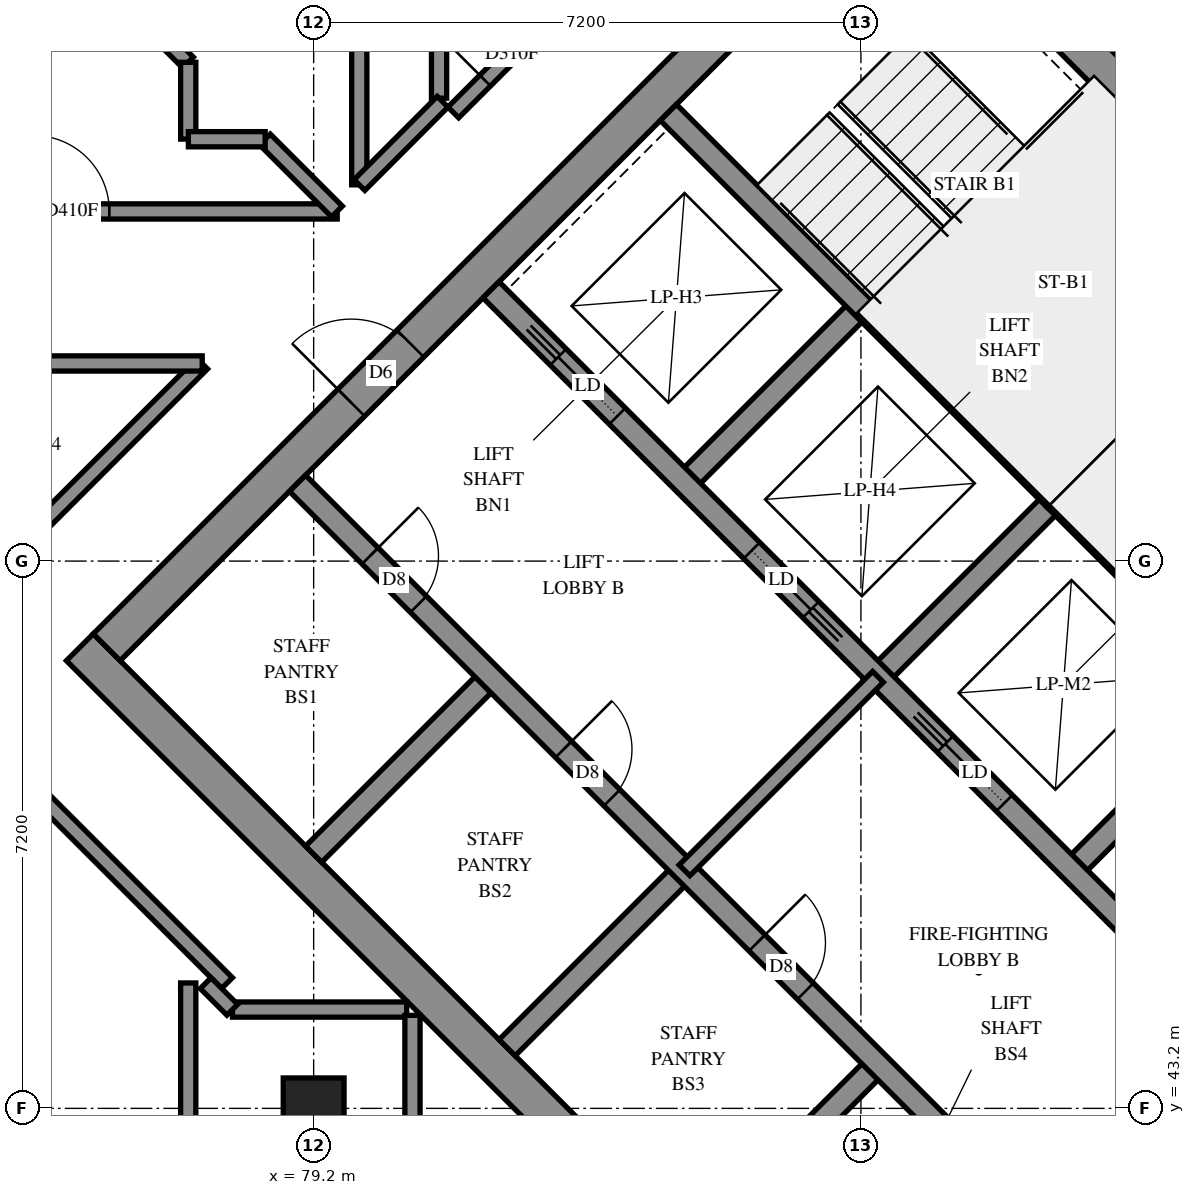
"""IFC4 building model, lengths in metres.
Left out: names, types, materials, properties, quantities, classifications, styles, units other than length and angle.
Written with IfcOpenShell. Run it as: python <this file> out.ifc"""

import sys

from ifc_helpers import new_model, si_unit, direction, frame, frame_2d, origin, origin_2d, place, context, subcontext, project, spatial, rectangle, extrude, element, fill, save


model = new_model("IFC4")
c1 = context("Model", 3, precision=1e-05, world=origin(), true_north=direction((0.0, 1.0)))
c2 = subcontext(c1, "Body", "Model", "MODEL_VIEW")
j1 = project(units=[si_unit("LENGTHUNIT", "METRE"), si_unit("PLANEANGLEUNIT", "RADIAN")], contexts=[c1])
p1 = place(None, origin())
s1 = spatial("IfcSite", under=j1, at=p1, CompositionType="ELEMENT")
p2 = place(p1, origin())
s2 = spatial("IfcBuilding", under=s1, at=p2, CompositionType="ELEMENT")
p3 = place(p2, frame((0.0, 0.0, 210.0)))
s3 = spatial("IfcBuildingStorey", under=s2, at=p3, CompositionType="ELEMENT", Elevation=210.0)
p4 = place(p3, frame((79.2, 43.2, 0.0), z_axis=(0.0, 0.0, 1.0), x_axis=(1.0, 0.0, 0.0)))
e1 = element("IfcColumn", 1, at=p4, inside=s3, PredefinedType="COLUMN", context=c2, shape_type="SweptSolid", body=[
    extrude(rectangle(XDim=0.8, YDim=0.8, at=origin_2d()), origin(), (0.0, 0.0, 1.0), 3.1),
])
p5 = place(p3, frame((76.124, 49.267, -0.3), z_axis=(0.0, 0.0, 1.0), x_axis=(0.7071067812, -0.7071067812, 0.0)))
e2 = element("IfcWall", 2, at=p5, inside=s3, PredefinedType="SHEAR", context=c2, shape_type="SweptSolid", body=[
    extrude(rectangle(XDim=15.4, YDim=0.5, at=frame_2d((7.7, 0.0))), origin(), (0.0, 0.0, 1.0), 2.7),
])
p6 = place(p3, frame((86.66, 59.802, -0.3), z_axis=(0.0, 0.0, 1.0), x_axis=(0.7071067812, -0.7071067812, 0.0)))
e3 = element("IfcWall", 3, at=p6, inside=s3, PredefinedType="SHEAR", context=c2, shape_type="SweptSolid", body=[
    extrude(rectangle(XDim=15.4, YDim=0.5, at=frame_2d((7.7, 0.0))), origin(), (0.0, 0.0, 1.0), 2.7),
])
p7 = place(p6, frame((10.5, 0.0, 0.3)))
e4 = element("IfcOpeningElement", 4, at=p7, cuts=e3, PredefinedType="OPENING", context=c2, shape_type="SweptSolid", body=[
    extrude(rectangle(XDim=0.8, YDim=2.1, at=frame_2d((0.4, 1.05))), frame((0.0, 0.26, 0.0), z_axis=(0.0, -1.0, 0.0), x_axis=(1.0, 0.0, 0.0)), (0.0, 0.0, 1.0), 0.52),
])
p8 = place(p3, frame((76.478, 49.267, -0.3), z_axis=(0.0, 0.0, 1.0), x_axis=(0.7071067812, 0.7071067812, 0.0)))
e5 = element("IfcWall", 5, at=p8, inside=s3, PredefinedType="SHEAR", context=c2, shape_type="SweptSolid", body=[
    extrude(rectangle(XDim=14.4, YDim=0.5, at=frame_2d((7.2, 0.0))), origin(), (0.0, 0.0, 1.0), 2.7),
])
p9 = place(p8, frame((4.55, 0.0, 0.3)))
e6 = element("IfcOpeningElement", 6, at=p9, cuts=e5, PredefinedType="OPENING", context=c2, shape_type="SweptSolid", body=[
    extrude(rectangle(XDim=1.1, YDim=2.1, at=frame_2d((0.55, 1.05))), frame((0.0, 0.26, 0.0), z_axis=(0.0, -1.0, 0.0), x_axis=(1.0, 0.0, 0.0)), (0.0, 0.0, 1.0), 0.52),
])
p10 = place(p8, frame((11.35, 0.0, 0.3)))
e7 = element("IfcOpeningElement", 7, at=p10, cuts=e5, PredefinedType="OPENING", context=c2, shape_type="SweptSolid", body=[
    extrude(rectangle(XDim=1.1, YDim=2.1, at=frame_2d((0.55, 1.05))), frame((0.0, 0.26, 0.0), z_axis=(0.0, -1.0, 0.0), x_axis=(1.0, 0.0, 0.0)), (0.0, 0.0, 1.0), 0.52),
])
p11 = place(p3, frame((87.013, 38.731, -0.3), z_axis=(0.0, 0.0, 1.0), x_axis=(0.7071067812, 0.7071067812, 0.0)))
e8 = element("IfcWall", 8, at=p11, inside=s3, PredefinedType="SHEAR", context=c2, shape_type="SweptSolid", body=[
    extrude(rectangle(XDim=14.4, YDim=0.5, at=frame_2d((7.2, 0.0))), origin(), (0.0, 0.0, 1.0), 2.7),
])
p12 = place(p11, frame((4.55, 0.0, 0.3)))
e9 = element("IfcOpeningElement", 9, at=p12, cuts=e8, PredefinedType="OPENING", context=c2, shape_type="SweptSolid", body=[
    extrude(rectangle(XDim=1.1, YDim=2.1, at=frame_2d((0.55, 1.05))), frame((0.0, 0.26, 0.0), z_axis=(0.0, -1.0, 0.0), x_axis=(1.0, 0.0, 0.0)), (0.0, 0.0, 1.0), 0.52),
])
p13 = place(p11, frame((11.35, 0.0, 0.3)))
e10 = element("IfcOpeningElement", 10, at=p13, cuts=e8, PredefinedType="OPENING", context=c2, shape_type="SweptSolid", body=[
    extrude(rectangle(XDim=1.1, YDim=2.1, at=frame_2d((0.55, 1.05))), frame((0.0, 0.26, 0.0), z_axis=(0.0, -1.0, 0.0), x_axis=(1.0, 0.0, 0.0)), (0.0, 0.0, 1.0), 0.52),
])
for number, where, z_axis, x_axis in (
    (11, (79.2, 46.544, 0.0), (0.0, 0.0, 1.0), (0.707, 0.707, 0.0)),
    (12, (84.079, 51.423, 0.0), (0.0, 0.0, 1.0), (0.707, 0.707, 0.0)),
):
    element("IfcWall", number, at=place(p3, frame(where, z_axis=z_axis, x_axis=x_axis)), inside=s3, PredefinedType="SOLIDWALL", context=c2, shape_type="SweptSolid", body=[
        extrude(rectangle(XDim=3.3, YDim=0.3, at=frame_2d((1.65, 0.0))), origin(), (0.0, 0.0, 1.0), 3.1),
    ])
p14 = place(p3, frame((81.746, 43.999, 0.0), z_axis=(0.0, 0.0, 1.0), x_axis=(0.7071067812, 0.7071067812, 0.0)))
e13 = element("IfcWall", 13, at=p14, inside=s3, PredefinedType="SOLIDWALL", context=c2, shape_type="SweptSolid", body=[
    extrude(rectangle(XDim=3.3, YDim=0.3, at=frame_2d((1.65, 0.0))), origin(), (0.0, 0.0, 1.0), 3.1),
])
p15 = place(p3, frame((86.625, 48.878, 0.0), z_axis=(0.0, 0.0, 1.0), x_axis=(0.7071067812, 0.7071067812, 0.0)))
e14 = element("IfcWall", 14, at=p15, inside=s3, PredefinedType="SOLIDWALL", context=c2, shape_type="SweptSolid", body=[
    extrude(rectangle(XDim=3.3, YDim=0.3, at=frame_2d((1.65, 0.0))), origin(), (0.0, 0.0, 1.0), 3.1),
])
p16 = place(p3, frame((84.291, 41.453, 0.0), z_axis=(0.0, 0.0, 1.0), x_axis=(0.7071067812, 0.7071067812, 0.0)))
e15 = element("IfcWall", 15, at=p16, inside=s3, PredefinedType="SOLIDWALL", context=c2, shape_type="SweptSolid", body=[
    extrude(rectangle(XDim=3.3, YDim=0.3, at=frame_2d((1.65, 0.0))), origin(), (0.0, 0.0, 1.0), 3.1),
])
p17 = place(p3, frame((89.17, 46.332, 0.0), z_axis=(0.0, 0.0, 1.0), x_axis=(0.7071067812, 0.7071067812, 0.0)))
e16 = element("IfcWall", 16, at=p17, inside=s3, PredefinedType="SOLIDWALL", context=c2, shape_type="SweptSolid", body=[
    extrude(rectangle(XDim=3.3, YDim=0.3, at=frame_2d((1.65, 0.0))), origin(), (0.0, 0.0, 1.0), 3.1),
])
p18 = place(p3, frame((78.988, 51.423, 0.0), z_axis=(0.0, 0.0, 1.0), x_axis=(0.7071067812, -0.7071067812, 0.0)))
e17 = element("IfcWall", 17, at=p18, inside=s3, PredefinedType="SOLIDWALL", context=c2, shape_type="SweptSolid", body=[
    extrude(rectangle(XDim=14.4, YDim=0.3, at=frame_2d((7.2, 0.0))), origin(), (0.0, 0.0, 1.0), 3.1),
])
p19 = place(p18, frame((1.35, 0.0, 0.0)))
e18 = element("IfcOpeningElement", 18, at=p19, cuts=e17, PredefinedType="OPENING", context=c2, shape_type="SweptSolid", body=[
    extrude(rectangle(XDim=0.9, YDim=2.1, at=frame_2d((0.45, 1.05))), frame((0.0, 0.16, 0.0), z_axis=(0.0, -1.0, 0.0), x_axis=(1.0, 0.0, 0.0)), (0.0, 0.0, 1.0), 0.32),
])
p20 = place(p18, frame((4.95, 0.0, 0.0)))
e19 = element("IfcOpeningElement", 19, at=p20, cuts=e17, PredefinedType="OPENING", context=c2, shape_type="SweptSolid", body=[
    extrude(rectangle(XDim=0.9, YDim=2.1, at=frame_2d((0.45, 1.05))), frame((0.0, 0.16, 0.0), z_axis=(0.0, -1.0, 0.0), x_axis=(1.0, 0.0, 0.0)), (0.0, 0.0, 1.0), 0.32),
])
p21 = place(p18, frame((8.55, 0.0, 0.0)))
e20 = element("IfcOpeningElement", 20, at=p21, cuts=e17, PredefinedType="OPENING", context=c2, shape_type="SweptSolid", body=[
    extrude(rectangle(XDim=0.9, YDim=2.1, at=frame_2d((0.45, 1.05))), frame((0.0, 0.16, 0.0), z_axis=(0.0, -1.0, 0.0), x_axis=(1.0, 0.0, 0.0)), (0.0, 0.0, 1.0), 0.32),
])
p22 = place(p18, frame((12.05, 0.0, 0.0)))
e21 = element("IfcOpeningElement", 21, at=p22, cuts=e17, PredefinedType="OPENING", context=c2, shape_type="SweptSolid", body=[
    extrude(rectangle(XDim=1.1, YDim=2.1, at=frame_2d((0.55, 1.05))), frame((0.0, 0.16, 0.0), z_axis=(0.0, -1.0, 0.0), x_axis=(1.0, 0.0, 0.0)), (0.0, 0.0, 1.0), 0.32),
])
p23 = place(p3, frame((81.534, 53.969, 0.0), z_axis=(0.0, 0.0, 1.0), x_axis=(0.707103309, -0.7071102534, 0.0)))
e22 = element("IfcWall", 22, at=p23, inside=s3, PredefinedType="SOLIDWALL", context=c2, shape_type="SweptSolid", body=[
    extrude(rectangle(XDim=14.4, YDim=0.3, at=frame_2d((7.2, 0.0))), origin(), (0.0, 0.0, 1.0), 3.1),
])
p24 = place(p23, frame((1.25, 0.0, 0.0)))
e23 = element("IfcOpeningElement", 23, at=p24, cuts=e22, PredefinedType="OPENING", context=c2, shape_type="SweptSolid", body=[
    extrude(rectangle(XDim=1.1, YDim=2.1, at=frame_2d((0.55, 1.05))), frame((0.0, 0.16, 0.0), z_axis=(0.0, -1.0, 0.0), x_axis=(1.0, 0.0, 0.0)), (0.0, 0.0, 1.0), 0.32),
])
p25 = place(p23, frame((4.85, 0.0, 0.0)))
e24 = element("IfcOpeningElement", 24, at=p25, cuts=e22, PredefinedType="OPENING", context=c2, shape_type="SweptSolid", body=[
    extrude(rectangle(XDim=1.1, YDim=2.1, at=frame_2d((0.55, 1.05))), frame((0.0, 0.16, 0.0), z_axis=(0.0, -1.0, 0.0), x_axis=(1.0, 0.0, 0.0)), (0.0, 0.0, 1.0), 0.32),
])
p26 = place(p23, frame((8.45, 0.0, 0.0)))
e25 = element("IfcOpeningElement", 25, at=p26, cuts=e22, PredefinedType="OPENING", context=c2, shape_type="SweptSolid", body=[
    extrude(rectangle(XDim=1.1, YDim=2.1, at=frame_2d((0.55, 1.05))), frame((0.0, 0.16, 0.0), z_axis=(0.0, -1.0, 0.0), x_axis=(1.0, 0.0, 0.0)), (0.0, 0.0, 1.0), 0.32),
])
p27 = place(p23, frame((12.05, 0.0, 0.0)))
e26 = element("IfcOpeningElement", 26, at=p27, cuts=e22, PredefinedType="OPENING", context=c2, shape_type="SweptSolid", body=[
    extrude(rectangle(XDim=1.1, YDim=2.1, at=frame_2d((0.55, 1.05))), frame((0.0, 0.16, 0.0), z_axis=(0.0, -1.0, 0.0), x_axis=(1.0, 0.0, 0.0)), (0.0, 0.0, 1.0), 0.32),
])
for number, where, z_axis, x_axis in (
    (27, (83.867, 56.302, 0.0), (0.0, 0.0, 1.0), (0.707, -0.707, 0.0)),
    (28, (88.958, 51.211, 0.0), (0.0, 0.0, 1.0), (0.707, -0.707, 0.0)),
):
    element("IfcWall", number, at=place(p3, frame(where, z_axis=z_axis, x_axis=x_axis)), inside=s3, PredefinedType="SOLIDWALL", context=c2, shape_type="SweptSolid", body=[
        extrude(rectangle(XDim=7.2, YDim=0.3, at=frame_2d((3.6, 0.0))), origin(), (0.0, 0.0, 1.0), 3.1),
    ])
p28 = place(p3, frame((88.958, 51.211, 0.0), z_axis=(0.0, 0.0, 1.0), x_axis=(0.7071067812, 0.7071067812, 0.0)))
e29 = element("IfcWall", 29, at=p28, inside=s3, PredefinedType="SOLIDWALL", context=c2, shape_type="SweptSolid", body=[
    extrude(rectangle(XDim=4.2, YDim=0.3, at=frame_2d((2.1, 0.0))), origin(), (0.0, 0.0, 1.0), 3.1),
])
p29 = place(p3, frame((84.079, 46.332, 0.0), z_axis=(0.0, 0.0, 1.0), x_axis=(0.7071067812, 0.7071067812, 0.0)))
e30 = element("IfcWall", 30, at=p29, inside=s3, PredefinedType="PARTITIONING", context=c2, shape_type="SweptSolid", body=[
    extrude(rectangle(XDim=3.6, YDim=0.2, at=frame_2d((1.8, 0.0))), origin(), (0.0, 0.0, 1.0), 3.1),
])
p30 = place(p3, frame((81.037, 56.303, 0.0), z_axis=(0.0, 0.0, 1.0), x_axis=(0.7071067812, 0.7071067812, 0.0)))
e31 = element("IfcWall", 31, at=p30, inside=s3, PredefinedType="PARTITIONING", context=c2, shape_type="SweptSolid", body=[
    extrude(rectangle(XDim=8.2, YDim=0.2, at=frame_2d((4.1, 0.0))), origin(), (0.0, 0.0, 1.0), 3.1),
])
p31 = place(p30, frame((0.592, 0.0, 0.0)))
e32 = element("IfcOpeningElement", 32, at=p31, cuts=e31, PredefinedType="OPENING", context=c2, shape_type="SweptSolid", body=[
    extrude(rectangle(XDim=1.0, YDim=2.1, at=frame_2d((0.5, 1.05))), frame((0.0, 0.11, 0.0), z_axis=(0.0, -1.0, 0.0), x_axis=(1.0, 0.0, 0.0)), (0.0, 0.0, 1.0), 0.22),
])
p32 = place(p3, frame((73.999, 48.911, 0.0), z_axis=(0.0, 0.0, 1.0), x_axis=(0.7071067812, -0.7071067812, 0.0)))
e33 = element("IfcWall", 33, at=p32, inside=s3, PredefinedType="PARTITIONING", context=c2, shape_type="SweptSolid", body=[
    extrude(rectangle(XDim=5.745, YDim=0.2, at=frame_2d((2.872, 0.0))), origin(), (0.0, 0.0, 1.0), 3.1),
])
p33 = place(p32, frame((0.724, 0.0, 0.0)))
e34 = element("IfcOpeningElement", 34, at=p33, cuts=e33, PredefinedType="OPENING", context=c2, shape_type="SweptSolid", body=[
    extrude(rectangle(XDim=1.0, YDim=2.1, at=frame_2d((0.5, 1.05))), frame((0.0, 0.11, 0.0), z_axis=(0.0, -1.0, 0.0), x_axis=(1.0, 0.0, 0.0)), (0.0, 0.0, 1.0), 0.22),
])
p34 = place(p3, frame((88.247, 60.683, 0.0), z_axis=(0.0, 0.0, 1.0), x_axis=(0.7071067812, -0.7071067812, 0.0)))
e35 = element("IfcWall", 35, at=p34, inside=s3, PredefinedType="PARTITIONING", context=c2, shape_type="SweptSolid", body=[
    extrude(rectangle(XDim=5.742, YDim=0.2, at=frame_2d((2.871, 0.0))), origin(), (0.0, 0.0, 1.0), 3.1),
])
p35 = place(p34, frame((4.069, 0.0, 0.0)))
e36 = element("IfcOpeningElement", 36, at=p35, cuts=e35, PredefinedType="OPENING", context=c2, shape_type="SweptSolid", body=[
    extrude(rectangle(XDim=0.9, YDim=2.1, at=frame_2d((0.45, 1.05))), frame((0.0, 0.11, 0.0), z_axis=(0.0, -1.0, 0.0), x_axis=(1.0, 0.0, 0.0)), (0.0, 0.0, 1.0), 0.22),
])
p36 = place(p3, frame((74.002, 55.0, 0.0), z_axis=(0.0, 0.0, 1.0), x_axis=(1.0, 0.0, 0.0)))
e37 = element("IfcWall", 37, at=p36, inside=s3, PredefinedType="PARTITIONING", context=c2, shape_type="SweptSolid", body=[
    extrude(rectangle(XDim=5.508, YDim=0.2, at=frame_2d((2.754, 0.0))), origin(), (0.0, 0.0, 1.0), 3.1),
])
p37 = place(p36, frame((1.51, 0.0, 0.0)))
e38 = element("IfcOpeningElement", 38, at=p37, cuts=e37, PredefinedType="OPENING", context=c2, shape_type="SweptSolid", body=[
    extrude(rectangle(XDim=1.0, YDim=2.1, at=frame_2d((0.5, 1.05))), frame((0.0, 0.11, 0.0), z_axis=(0.0, -1.0, 0.0), x_axis=(1.0, 0.0, 0.0)), (0.0, 0.0, 1.0), 0.22),
])
p38 = place(p3, frame((74.001, 49.267, 0.0), z_axis=(0.0, 0.0, 1.0), x_axis=(0.7071067812, 0.7071067812, 0.0)))
e39 = element("IfcWall", 39, at=p38, inside=s3, PredefinedType="PARTITIONING", context=c2, shape_type="SweptSolid", body=[
    extrude(rectangle(XDim=5.278, YDim=0.2, at=frame_2d((2.639, 0.0))), origin(), (0.0, 0.0, 1.0), 3.1),
])
p39 = place(p3, frame((74.197, 60.309, 0.0), z_axis=(0.0, 0.0, 1.0), x_axis=(0.7071067812, -0.7071067812, 0.0)))
e40 = element("IfcWall", 40, at=p39, inside=s3, PredefinedType="PARTITIONING", context=c2, shape_type="SweptSolid", body=[
    extrude(rectangle(XDim=4.738, YDim=0.2, at=frame_2d((2.369, 0.0))), origin(), (0.0, 0.0, 1.0), 3.1),
])
p40 = place(p3, frame((79.8, 55.35, 0.0), z_axis=(0.0, 0.0, 1.0), x_axis=(0.0, 1.0, 0.0)))
e41 = element("IfcWall", 41, at=p40, inside=s3, PredefinedType="PARTITIONING", context=c2, shape_type="SweptSolid", body=[
    extrude(rectangle(XDim=3.9, YDim=0.2, at=frame_2d((1.95, 0.0))), origin(), (0.0, 0.0, 1.0), 3.1),
])
p41 = place(p3, frame((74.002, 53.0, 0.0), z_axis=(0.0, 0.0, 1.0), x_axis=(1.0, 0.0, 0.0)))
e42 = element("IfcWall", 42, at=p41, inside=s3, PredefinedType="PARTITIONING", context=c2, shape_type="SweptSolid", body=[
    extrude(rectangle(XDim=3.732, YDim=0.2, at=frame_2d((1.866, 0.0))), origin(), (0.0, 0.0, 1.0), 3.1),
])
p42 = place(p41, frame((0.564, 0.0, 0.0)))
e43 = element("IfcOpeningElement", 43, at=p42, cuts=e42, PredefinedType="OPENING", context=c2, shape_type="SweptSolid", body=[
    extrude(rectangle(XDim=1.0, YDim=2.1, at=frame_2d((0.5, 1.05))), frame((0.0, 0.11, 0.0), z_axis=(0.0, -1.0, 0.0), x_axis=(1.0, 0.0, 0.0)), (0.0, 0.0, 1.0), 0.22),
])
p43 = place(p3, frame((77.55, 41.587, 0.0), z_axis=(0.0, 0.0, 1.0), x_axis=(0.0, 1.0, 0.0)))
e44 = element("IfcWall", 44, at=p43, inside=s3, PredefinedType="PARTITIONING", context=c2, shape_type="SweptSolid", body=[
    extrude(rectangle(XDim=3.264, YDim=0.2, at=frame_2d((1.632, 0.0))), origin(), (0.0, 0.0, 1.0), 3.1),
])
for number, where, z_axis, x_axis in (
    (45, (78.132, 44.5, 0.0), (0.0, 0.0, 1.0), (1.0, 0.0, 0.0)),
    (46, (80.5, 42.132, 0.0), (0.0, 0.0, 1.0), (0.0, 1.0, 0.0)),
):
    element("IfcWall", number, at=place(p3, frame(where, z_axis=z_axis, x_axis=x_axis)), inside=s3, PredefinedType="PARTITIONING", context=c2, shape_type="SweptSolid", body=[
        extrude(rectangle(XDim=2.292, YDim=0.2, at=frame_2d((1.146, 0.0))), origin(), (0.0, 0.0, 1.0), 3.1),
    ])
p44 = place(p3, frame((80.85, 56.49, 0.0), z_axis=(0.0, 0.0, 1.0), x_axis=(0.0, 1.0, 0.0)))
e47 = element("IfcWall", 47, at=p44, inside=s3, PredefinedType="PARTITIONING", context=c2, shape_type="SweptSolid", body=[
    extrude(rectangle(XDim=1.886, YDim=0.2, at=frame_2d((0.943, 0.0))), origin(), (0.0, 0.0, 1.0), 3.1),
])
p45 = place(p3, frame((79.803, 55.347, 0.0), z_axis=(0.0, 0.0, 1.0), x_axis=(0.706460727, 0.7077522457, 0.0)))
e48 = element("IfcWall", 48, at=p45, inside=s3, PredefinedType="PARTITIONING", context=c2, shape_type="SweptSolid", body=[
    extrude(rectangle(XDim=1.549, YDim=0.2, at=frame_2d((0.774, 0.0))), origin(), (0.0, 0.0, 1.0), 3.1),
])
p46 = place(p3, frame((78.559, 55.947, 0.0), z_axis=(0.0, 0.0, 1.0), x_axis=(0.7071067812, -0.7071067812, 0.0)))
e49 = element("IfcWall", 49, at=p46, inside=s3, PredefinedType="PARTITIONING", context=c2, shape_type="SweptSolid", body=[
    extrude(rectangle(XDim=1.341, YDim=0.2, at=frame_2d((0.67, 0.0))), origin(), (0.0, 0.0, 1.0), 3.1),
])
for number, where, z_axis, x_axis in (
    (50, (77.55, 55.952, 0.0), (0.0, 0.0, 1.0), (0.0, 1.0, 0.0)),
    (51, (77.552, 55.95, 0.0), (0.0, 0.0, 1.0), (1.0, 0.0, 0.0)),
):
    element("IfcWall", number, at=place(p3, frame(where, z_axis=z_axis, x_axis=x_axis)), inside=s3, PredefinedType="PARTITIONING", context=c2, shape_type="SweptSolid", body=[
        extrude(rectangle(XDim=1.01, YDim=0.2, at=frame_2d((0.505, 0.0))), origin(), (0.0, 0.0, 1.0), 3.1),
    ])
p47 = place(p3, frame((77.779, 44.847, 0.0), z_axis=(0.0, 0.0, 1.0), x_axis=(0.7071067812, -0.7071067812, 0.0)))
e52 = element("IfcWall", 52, at=p47, inside=s3, PredefinedType="PARTITIONING", context=c2, shape_type="SweptSolid", body=[
    extrude(rectangle(XDim=0.495, YDim=0.2, at=frame_2d((0.247, 0.0))), origin(), (0.0, 0.0, 1.0), 3.1),
])
p48 = place(p9, origin())
e53 = element("IfcDoor", 53, at=p48, inside=s3, OperationType="DOUBLE_DOOR_SINGLE_SWING", PredefinedType="DOOR", context=c2, shape_type="SweptSolid", body=[
    extrude(rectangle(XDim=1.1, YDim=2.1, at=frame_2d((0.55, 1.05))), frame((0.0, 0.025, 0.0), z_axis=(0.0, -1.0, 0.0), x_axis=(1.0, 0.0, 0.0)), (0.0, 0.0, 1.0), 0.05),
])
fill(e6, e53)
p49 = place(p19, origin())
e54 = element("IfcDoor", 54, at=p49, inside=s3, OperationType="SINGLE_SWING_LEFT", PredefinedType="DOOR", context=c2, shape_type="SweptSolid", body=[
    extrude(rectangle(XDim=0.9, YDim=2.1, at=frame_2d((0.45, 1.05))), frame((0.0, 0.025, 0.0), z_axis=(0.0, -1.0, 0.0), x_axis=(1.0, 0.0, 0.0)), (0.0, 0.0, 1.0), 0.05),
])
fill(e18, e54)
p50 = place(p20, origin())
e55 = element("IfcDoor", 55, at=p50, inside=s3, OperationType="SINGLE_SWING_LEFT", PredefinedType="DOOR", context=c2, shape_type="SweptSolid", body=[
    extrude(rectangle(XDim=0.9, YDim=2.1, at=frame_2d((0.45, 1.05))), frame((0.0, 0.025, 0.0), z_axis=(0.0, -1.0, 0.0), x_axis=(1.0, 0.0, 0.0)), (0.0, 0.0, 1.0), 0.05),
])
fill(e19, e55)
p51 = place(p21, origin())
e56 = element("IfcDoor", 56, at=p51, inside=s3, OperationType="SINGLE_SWING_LEFT", PredefinedType="DOOR", context=c2, shape_type="SweptSolid", body=[
    extrude(rectangle(XDim=0.9, YDim=2.1, at=frame_2d((0.45, 1.05))), frame((0.0, 0.025, 0.0), z_axis=(0.0, -1.0, 0.0), x_axis=(1.0, 0.0, 0.0)), (0.0, 0.0, 1.0), 0.05),
])
fill(e20, e56)
p52 = place(p24, origin())
e57 = element("IfcDoor", 57, at=p52, inside=s3, OperationType="SLIDING_TO_LEFT", PredefinedType="DOOR", context=c2, shape_type="SweptSolid", body=[
    extrude(rectangle(XDim=1.1, YDim=2.1, at=frame_2d((0.55, 1.05))), frame((0.0, 0.025, 0.0), z_axis=(0.0, -1.0, 0.0), x_axis=(1.0, 0.0, 0.0)), (0.0, 0.0, 1.0), 0.05),
])
fill(e23, e57)
p53 = place(p25, origin())
e58 = element("IfcDoor", 58, at=p53, inside=s3, OperationType="SLIDING_TO_RIGHT", PredefinedType="DOOR", context=c2, shape_type="SweptSolid", body=[
    extrude(rectangle(XDim=1.1, YDim=2.1, at=frame_2d((0.55, 1.05))), frame((0.0, 0.025, 0.0), z_axis=(0.0, -1.0, 0.0), x_axis=(1.0, 0.0, 0.0)), (0.0, 0.0, 1.0), 0.05),
])
fill(e24, e58)
p54 = place(p26, origin())
e59 = element("IfcDoor", 59, at=p54, inside=s3, OperationType="SLIDING_TO_LEFT", PredefinedType="DOOR", context=c2, shape_type="SweptSolid", body=[
    extrude(rectangle(XDim=1.1, YDim=2.1, at=frame_2d((0.55, 1.05))), frame((0.0, 0.025, 0.0), z_axis=(0.0, -1.0, 0.0), x_axis=(1.0, 0.0, 0.0)), (0.0, 0.0, 1.0), 0.05),
])
fill(e25, e59)
p55 = place(p37, origin())
e60 = element("IfcDoor", 60, at=p55, inside=s3, OperationType="SINGLE_SWING_LEFT", PredefinedType="DOOR", context=c2, shape_type="SweptSolid", body=[
    extrude(rectangle(XDim=1.0, YDim=2.1, at=frame_2d((0.5, 1.05))), frame((0.0, 0.025, 0.0), z_axis=(0.0, -1.0, 0.0), x_axis=(1.0, 0.0, 0.0)), (0.0, 0.0, 1.0), 0.05),
])
fill(e38, e60)
p56 = place(p31, origin())
e61 = element("IfcDoor", 61, at=p56, inside=s3, OperationType="SINGLE_SWING_RIGHT", PredefinedType="DOOR", context=c2, shape_type="SweptSolid", body=[
    extrude(rectangle(XDim=1.0, YDim=2.1, at=frame_2d((0.5, 1.05))), frame((0.0, 0.025, 0.0), z_axis=(0.0, -1.0, 0.0), x_axis=(1.0, 0.0, 0.0)), (0.0, 0.0, 1.0), 0.05),
])
fill(e32, e61)
save(model, sys.argv[1])
